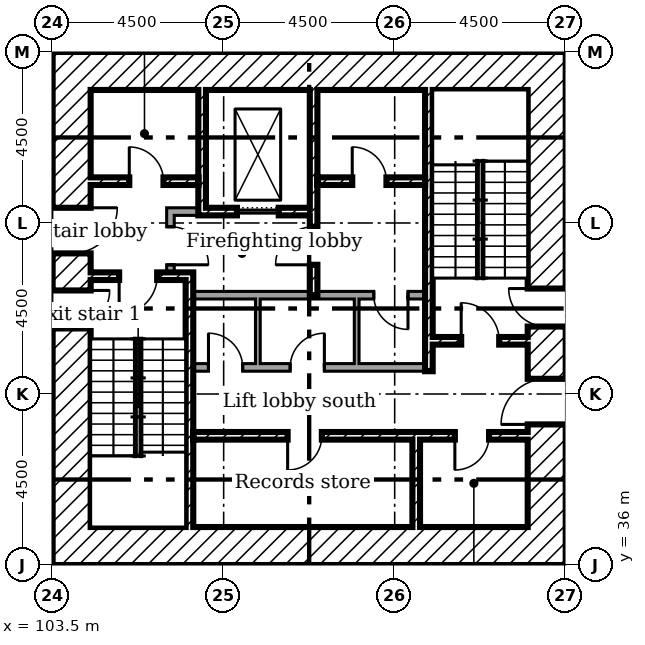
"""IFC4 building model, lengths in metres.
Left out: names, types, materials, properties, quantities, classifications, styles, units other than length and angle.
Written with IfcOpenShell. Run it as: python <this file> out.ifc"""

import sys

from ifc_helpers import new_model, si_unit, direction, frame, frame_2d, origin, place, context, subcontext, project, spatial, rectangle, extrude, element, fill, save


model = new_model("IFC4")
c1 = context("Model", 3, precision=1e-05, world=origin(), true_north=direction((0.0, 1.0)))
c2 = subcontext(c1, "Body", "Model", "MODEL_VIEW")
j1 = project(units=[si_unit("LENGTHUNIT", "METRE"), si_unit("PLANEANGLEUNIT", "RADIAN")], contexts=[c1])
p1 = place(None, origin())
s1 = spatial("IfcSite", under=j1, at=p1, CompositionType="ELEMENT")
p2 = place(p1, origin())
s2 = spatial("IfcBuilding", under=s1, at=p2, CompositionType="ELEMENT")
p3 = place(p2, frame((0.0, 0.0, -8.0)))
s3 = spatial("IfcBuildingStorey", under=s2, at=p3, CompositionType="ELEMENT", Elevation=-8.0)
p4 = place(p3, frame((116.5, 36.0, 0.0), z_axis=(0.0, 0.0, 1.0), x_axis=(0.0, 1.0, 0.0)))
e1 = element("IfcWall", 1, at=p4, inside=s3, PredefinedType="SHEAR", context=c2, shape_type="SweptSolid", body=[
    extrude(rectangle(XDim=13.5, YDim=1.0, at=frame_2d((6.75, 0.0))), origin(), (0.0, 0.0, 1.0), 3.5),
])
p5 = place(p4, frame((3.7, 0.0, 0.0)))
e2 = element("IfcOpeningElement", 2, at=p5, cuts=e1, PredefinedType="OPENING", context=c2, shape_type="SweptSolid", body=[
    extrude(rectangle(XDim=1.2, YDim=2.1, at=frame_2d((0.6, 1.05))), frame((0.0, 0.51, 0.0), z_axis=(0.0, -1.0, 0.0), x_axis=(1.0, 0.0, 0.0)), (0.0, 0.0, 1.0), 1.02),
])
p6 = place(p4, frame((6.275, 0.0, 0.0)))
e3 = element("IfcOpeningElement", 3, at=p6, cuts=e1, PredefinedType="OPENING", context=c2, shape_type="SweptSolid", body=[
    extrude(rectangle(XDim=1.0, YDim=2.1, at=frame_2d((0.5, 1.05))), frame((0.0, 0.51, 0.0), z_axis=(0.0, -1.0, 0.0), x_axis=(1.0, 0.0, 0.0)), (0.0, 0.0, 1.0), 1.02),
])
for number, where in (
    (4, (104.5, 49.0, 0.0)),
    (5, (104.5, 36.5, 0.0)),
):
    element("IfcWall", number, at=place(p3, frame(where)), inside=s3, PredefinedType="SHEAR", context=c2, shape_type="SweptSolid", body=[
        extrude(rectangle(XDim=11.5, YDim=1.0, at=frame_2d((5.75, 0.0))), origin(), (0.0, 0.0, 1.0), 3.5),
    ])
p7 = place(p3, frame((104.0, 36.0, 0.0), z_axis=(0.0, 0.0, 1.0), x_axis=(0.0, 1.0, 0.0)))
e6 = element("IfcWall", 6, at=p7, inside=s3, PredefinedType="SHEAR", context=c2, shape_type="SweptSolid", body=[
    extrude(rectangle(XDim=13.5, YDim=1.0, at=frame_2d((6.75, 0.0))), origin(), (0.0, 0.0, 1.0), 3.5),
])
p8 = place(p7, frame((8.2, 0.0, 0.0)))
e7 = element("IfcOpeningElement", 7, at=p8, cuts=e6, PredefinedType="OPENING", context=c2, shape_type="SweptSolid", body=[
    extrude(rectangle(XDim=1.2, YDim=2.1, at=frame_2d((0.6, 1.05))), frame((0.0, 0.51, 0.0), z_axis=(0.0, -1.0, 0.0), x_axis=(1.0, 0.0, 0.0)), (0.0, 0.0, 1.0), 1.02),
])
p9 = place(p7, frame((6.225, 0.0, 0.0)))
e8 = element("IfcOpeningElement", 8, at=p9, cuts=e6, PredefinedType="OPENING", context=c2, shape_type="SweptSolid", body=[
    extrude(rectangle(XDim=1.0, YDim=2.1, at=frame_2d((0.5, 1.05))), frame((0.0, 0.51, 0.0), z_axis=(0.0, -1.0, 0.0), x_axis=(1.0, 0.0, 0.0)), (0.0, 0.0, 1.0), 1.02),
])
p10 = place(p3, frame((107.433, 48.5, 0.0), z_axis=(0.0, 0.0, 1.0), x_axis=(0.0, -1.0, 0.0)))
e9 = element("IfcWall", 9, at=p10, inside=s3, PredefinedType="SHEAR", context=c2, shape_type="SweptSolid", body=[
    extrude(rectangle(XDim=3.3, YDim=0.2, at=frame_2d((1.65, 0.0))), origin(), (0.0, 0.0, 1.0), 3.5),
])
p11 = place(p3, frame((110.367, 48.5, 0.0), z_axis=(0.0, 0.0, 1.0), x_axis=(0.0, -1.0, 0.0)))
e10 = element("IfcWall", 10, at=p11, inside=s3, PredefinedType="SHEAR", context=c2, shape_type="SweptSolid", body=[
    extrude(rectangle(XDim=5.4, YDim=0.2, at=frame_2d((2.7, 0.0))), origin(), (0.0, 0.0, 1.0), 3.5),
])
p12 = place(p11, frame((3.6, 0.0, 0.0)))
e11 = element("IfcOpeningElement", 11, at=p12, cuts=e10, PredefinedType="OPENING", context=c2, shape_type="SweptSolid", body=[
    extrude(rectangle(XDim=1.0, YDim=2.1, at=frame_2d((0.5, 1.05))), frame((0.0, 0.11, 0.0), z_axis=(0.0, -1.0, 0.0), x_axis=(1.0, 0.0, 0.0)), (0.0, 0.0, 1.0), 0.22),
])
p13 = place(p3, frame((113.067, 37.0, 0.0), z_axis=(0.0, 0.0, 1.0), x_axis=(0.0, 1.0, 0.0)))
e12 = element("IfcWall", 12, at=p13, inside=s3, PredefinedType="SHEAR", context=c2, shape_type="SweptSolid", body=[
    extrude(rectangle(XDim=2.3, YDim=0.2, at=frame_2d((1.15, 0.0))), origin(), (0.0, 0.0, 1.0), 3.5),
])
p14 = place(p3, frame((106.5, 45.3, 0.0)))
e13 = element("IfcWall", 13, at=p14, inside=s3, PredefinedType="PARTITIONING", context=c2, shape_type="SweptSolid", body=[
    extrude(rectangle(XDim=0.833, YDim=0.2, at=frame_2d((0.417, 0.0))), origin(), (0.0, 0.0, 1.0), 3.5),
])
p15 = place(p3, frame((106.6, 43.7, 0.0), z_axis=(0.0, 0.0, 1.0), x_axis=(0.0, 1.0, 0.0)))
e14 = element("IfcWall", 14, at=p15, inside=s3, PredefinedType="PARTITIONING", context=c2, shape_type="SweptSolid", body=[
    extrude(rectangle(XDim=1.5, YDim=0.2, at=frame_2d((0.75, 0.0))), origin(), (0.0, 0.0, 1.0), 3.5),
])
p16 = place(p15, frame((0.2, 0.0, 0.0)))
e15 = element("IfcOpeningElement", 15, at=p16, cuts=e14, PredefinedType="OPENING", context=c2, shape_type="SweptSolid", body=[
    extrude(rectangle(XDim=1.0, YDim=2.1, at=frame_2d((0.5, 1.05))), frame((0.0, 0.11, 0.0), z_axis=(0.0, -1.0, 0.0), x_axis=(1.0, 0.0, 0.0)), (0.0, 0.0, 1.0), 0.22),
])
p17 = place(p3, frame((104.5, 46.1, 0.0)))
e16 = element("IfcWall", 16, at=p17, inside=s3, PredefinedType="SHEAR", context=c2, shape_type="SweptSolid", body=[
    extrude(rectangle(XDim=2.833, YDim=0.2, at=frame_2d((1.417, 0.0))), origin(), (0.0, 0.0, 1.0), 3.5),
])
p18 = place(p17, frame((1.017, 0.0, 0.0)))
e17 = element("IfcOpeningElement", 17, at=p18, cuts=e16, PredefinedType="OPENING", context=c2, shape_type="SweptSolid", body=[
    extrude(rectangle(XDim=0.9, YDim=2.1, at=frame_2d((0.45, 1.05))), frame((0.0, 0.11, 0.0), z_axis=(0.0, -1.0, 0.0), x_axis=(1.0, 0.0, 0.0)), (0.0, 0.0, 1.0), 0.22),
])
p19 = place(p3, frame((110.467, 46.1, 0.0)))
e18 = element("IfcWall", 18, at=p19, inside=s3, PredefinedType="SHEAR", context=c2, shape_type="SweptSolid", body=[
    extrude(rectangle(XDim=2.833, YDim=0.2, at=frame_2d((1.417, 0.0))), origin(), (0.0, 0.0, 1.0), 3.5),
])
p20 = place(p19, frame((0.917, 0.0, 0.0)))
e19 = element("IfcOpeningElement", 19, at=p20, cuts=e18, PredefinedType="OPENING", context=c2, shape_type="SweptSolid", body=[
    extrude(rectangle(XDim=0.9, YDim=2.1, at=frame_2d((0.45, 1.05))), frame((0.0, 0.11, 0.0), z_axis=(0.0, -1.0, 0.0), x_axis=(1.0, 0.0, 0.0)), (0.0, 0.0, 1.0), 0.22),
])
p21 = place(p3, frame((107.533, 45.3, 0.0)))
e20 = element("IfcWall", 20, at=p21, inside=s3, PredefinedType="SHEAR", context=c2, shape_type="SweptSolid", body=[
    extrude(rectangle(XDim=2.733, YDim=0.2, at=frame_2d((1.367, 0.0))), origin(), (0.0, 0.0, 1.0), 3.5),
])
p22 = place(p21, frame((0.817, 0.0, 0.0)))
e21 = element("IfcOpeningElement", 21, at=p22, cuts=e20, PredefinedType="OPENING", context=c2, shape_type="SweptSolid", body=[
    extrude(rectangle(XDim=1.1, YDim=2.1, at=frame_2d((0.55, 1.05))), frame((0.0, 0.11, 0.0), z_axis=(0.0, -1.0, 0.0), x_axis=(1.0, 0.0, 0.0)), (0.0, 0.0, 1.0), 0.22),
])
p23 = place(p3, frame((107.2, 39.4, 0.0)))
e22 = element("IfcWall", 22, at=p23, inside=s3, PredefinedType="SHEAR", context=c2, shape_type="SweptSolid", body=[
    extrude(rectangle(XDim=8.8, YDim=0.2, at=frame_2d((4.4, 0.0))), origin(), (0.0, 0.0, 1.0), 3.5),
])
p24 = place(p23, frame((2.483, 0.0, 0.0)))
e23 = element("IfcOpeningElement", 23, at=p24, cuts=e22, PredefinedType="OPENING", context=c2, shape_type="SweptSolid", body=[
    extrude(rectangle(XDim=0.9, YDim=2.1, at=frame_2d((0.45, 1.05))), frame((0.0, 0.11, 0.0), z_axis=(0.0, -1.0, 0.0), x_axis=(1.0, 0.0, 0.0)), (0.0, 0.0, 1.0), 0.22),
])
p25 = place(p23, frame((6.883, 0.0, 0.0)))
e24 = element("IfcOpeningElement", 24, at=p25, cuts=e22, PredefinedType="OPENING", context=c2, shape_type="SweptSolid", body=[
    extrude(rectangle(XDim=0.9, YDim=2.1, at=frame_2d((0.45, 1.05))), frame((0.0, 0.11, 0.0), z_axis=(0.0, -1.0, 0.0), x_axis=(1.0, 0.0, 0.0)), (0.0, 0.0, 1.0), 0.22),
])
p26 = place(p3, frame((107.1, 37.0, 0.0), z_axis=(0.0, 0.0, 1.0), x_axis=(0.0, 1.0, 0.0)))
e25 = element("IfcWall", 25, at=p26, inside=s3, PredefinedType="SHEAR", context=c2, shape_type="SweptSolid", body=[
    extrude(rectangle(XDim=6.7, YDim=0.2, at=frame_2d((3.35, 0.0))), origin(), (0.0, 0.0, 1.0), 3.5),
])
p27 = place(p3, frame((104.5, 43.6, 0.0)))
e26 = element("IfcWall", 26, at=p27, inside=s3, PredefinedType="SHEAR", context=c2, shape_type="SweptSolid", body=[
    extrude(rectangle(XDim=2.5, YDim=0.2, at=frame_2d((1.25, 0.0))), origin(), (0.0, 0.0, 1.0), 3.5),
])
p28 = place(p27, frame((0.75, 0.0, 0.0)))
e27 = element("IfcOpeningElement", 27, at=p28, cuts=e26, PredefinedType="OPENING", context=c2, shape_type="SweptSolid", body=[
    extrude(rectangle(XDim=1.0, YDim=2.1, at=frame_2d((0.5, 1.05))), frame((0.0, 0.11, 0.0), z_axis=(0.0, -1.0, 0.0), x_axis=(1.0, 0.0, 0.0)), (0.0, 0.0, 1.0), 0.22),
])
p29 = place(p3, frame((113.5, 41.9, 0.0)))
e28 = element("IfcWall", 28, at=p29, inside=s3, PredefinedType="SHEAR", context=c2, shape_type="SweptSolid", body=[
    extrude(rectangle(XDim=2.5, YDim=0.2, at=frame_2d((1.25, 0.0))), origin(), (0.0, 0.0, 1.0), 3.5),
])
p30 = place(p29, frame((0.75, 0.0, 0.0)))
e29 = element("IfcOpeningElement", 29, at=p30, cuts=e28, PredefinedType="OPENING", context=c2, shape_type="SweptSolid", body=[
    extrude(rectangle(XDim=1.0, YDim=2.1, at=frame_2d((0.5, 1.05))), frame((0.0, 0.11, 0.0), z_axis=(0.0, -1.0, 0.0), x_axis=(1.0, 0.0, 0.0)), (0.0, 0.0, 1.0), 0.22),
])
p31 = place(p3, frame((113.4, 41.1, 0.0), z_axis=(0.0, 0.0, 1.0), x_axis=(0.0, 1.0, 0.0)))
e30 = element("IfcWall", 30, at=p31, inside=s3, PredefinedType="SHEAR", context=c2, shape_type="SweptSolid", body=[
    extrude(rectangle(XDim=7.4, YDim=0.2, at=frame_2d((3.7, 0.0))), origin(), (0.0, 0.0, 1.0), 3.5),
])
p32 = place(p3, frame((107.2, 43.1, 0.0)))
e31 = element("IfcWall", 31, at=p32, inside=s3, PredefinedType="PARTITIONING", context=c2, shape_type="SweptSolid", body=[
    extrude(rectangle(XDim=6.1, YDim=0.2, at=frame_2d((3.05, 0.0))), origin(), (0.0, 0.0, 1.0), 3.5),
])
p33 = place(p32, frame((4.75, 0.0, 0.0)))
e32 = element("IfcOpeningElement", 32, at=p33, cuts=e31, PredefinedType="OPENING", context=c2, shape_type="SweptSolid", body=[
    extrude(rectangle(XDim=0.9, YDim=2.1, at=frame_2d((0.45, 1.05))), frame((0.0, 0.11, 0.0), z_axis=(0.0, -1.0, 0.0), x_axis=(1.0, 0.0, 0.0)), (0.0, 0.0, 1.0), 0.22),
])
p34 = place(p3, frame((107.2, 41.2, 0.0)))
e33 = element("IfcWall", 33, at=p34, inside=s3, PredefinedType="PARTITIONING", context=c2, shape_type="SweptSolid", body=[
    extrude(rectangle(XDim=6.1, YDim=0.2, at=frame_2d((3.05, 0.0))), origin(), (0.0, 0.0, 1.0), 3.5),
])
p35 = place(p34, frame((0.4, 0.0, 0.0)))
e34 = element("IfcOpeningElement", 34, at=p35, cuts=e33, PredefinedType="OPENING", context=c2, shape_type="SweptSolid", body=[
    extrude(rectangle(XDim=0.9, YDim=2.1, at=frame_2d((0.45, 1.05))), frame((0.0, 0.11, 0.0), z_axis=(0.0, -1.0, 0.0), x_axis=(1.0, 0.0, 0.0)), (0.0, 0.0, 1.0), 0.22),
])
p36 = place(p34, frame((2.55, 0.0, 0.0)))
e35 = element("IfcOpeningElement", 35, at=p36, cuts=e33, PredefinedType="OPENING", context=c2, shape_type="SweptSolid", body=[
    extrude(rectangle(XDim=0.9, YDim=2.1, at=frame_2d((0.45, 1.05))), frame((0.0, 0.11, 0.0), z_axis=(0.0, -1.0, 0.0), x_axis=(1.0, 0.0, 0.0)), (0.0, 0.0, 1.0), 0.22),
])
for number, where, z_axis, x_axis in (
    (36, (108.9, 41.3, 0.0), (0.0, 0.0, 1.0), (0.0, 1.0, 0.0)),
    (37, (111.5, 41.3, 0.0), (0.0, 0.0, 1.0), (0.0, 1.0, 0.0)),
):
    element("IfcWall", number, at=place(p3, frame(where, z_axis=z_axis, x_axis=x_axis)), inside=s3, PredefinedType="PARTITIONING", context=c2, shape_type="SweptSolid", body=[
        extrude(rectangle(XDim=1.7, YDim=0.125, at=frame_2d((0.85, 0.0))), origin(), (0.0, 0.0, 1.0), 3.5),
    ])
p37 = place(p8, frame((1.2, 0.0, 0.0), x_axis=(-1.0, 0.0, 0.0)))
e38 = element("IfcDoor", 38, at=p37, inside=s3, OperationType="SINGLE_SWING_RIGHT", PredefinedType="DOOR", context=c2, shape_type="SweptSolid", body=[
    extrude(rectangle(XDim=1.2, YDim=2.1, at=frame_2d((0.6, 1.05))), frame((0.0, 0.025, 0.0), z_axis=(0.0, -1.0, 0.0), x_axis=(1.0, 0.0, 0.0)), (0.0, 0.0, 1.0), 0.05),
])
fill(e7, e38)
p38 = place(p5, origin())
e39 = element("IfcDoor", 39, at=p38, inside=s3, OperationType="SINGLE_SWING_RIGHT", PredefinedType="DOOR", context=c2, shape_type="SweptSolid", body=[
    extrude(rectangle(XDim=1.2, YDim=2.1, at=frame_2d((0.6, 1.05))), frame((0.0, 0.025, 0.0), z_axis=(0.0, -1.0, 0.0), x_axis=(1.0, 0.0, 0.0)), (0.0, 0.0, 1.0), 0.05),
])
fill(e2, e39)
p39 = place(p28, frame((1.0, 0.0, 0.0), x_axis=(-1.0, 0.0, 0.0)))
e40 = element("IfcDoor", 40, at=p39, inside=s3, OperationType="SINGLE_SWING_LEFT", PredefinedType="DOOR", context=c2, shape_type="SweptSolid", body=[
    extrude(rectangle(XDim=1.0, YDim=2.1, at=frame_2d((0.5, 1.05))), frame((0.0, 0.025, 0.0), z_axis=(0.0, -1.0, 0.0), x_axis=(1.0, 0.0, 0.0)), (0.0, 0.0, 1.0), 0.05),
])
fill(e27, e40)
p40 = place(p9, frame((1.0, 0.0, 0.0), x_axis=(-1.0, 0.0, 0.0)))
e41 = element("IfcDoor", 41, at=p40, inside=s3, OperationType="SINGLE_SWING_RIGHT", PredefinedType="DOOR", context=c2, shape_type="SweptSolid", body=[
    extrude(rectangle(XDim=1.0, YDim=2.1, at=frame_2d((0.5, 1.05))), frame((0.0, 0.025, 0.0), z_axis=(0.0, -1.0, 0.0), x_axis=(1.0, 0.0, 0.0)), (0.0, 0.0, 1.0), 0.05),
])
fill(e8, e41)
p41 = place(p30, origin())
e42 = element("IfcDoor", 42, at=p41, inside=s3, OperationType="SINGLE_SWING_RIGHT", PredefinedType="DOOR", context=c2, shape_type="SweptSolid", body=[
    extrude(rectangle(XDim=1.0, YDim=2.1, at=frame_2d((0.5, 1.05))), frame((0.0, 0.025, 0.0), z_axis=(0.0, -1.0, 0.0), x_axis=(1.0, 0.0, 0.0)), (0.0, 0.0, 1.0), 0.05),
])
fill(e29, e42)
p42 = place(p6, origin())
e43 = element("IfcDoor", 43, at=p42, inside=s3, OperationType="SINGLE_SWING_LEFT", PredefinedType="DOOR", context=c2, shape_type="SweptSolid", body=[
    extrude(rectangle(XDim=1.0, YDim=2.1, at=frame_2d((0.5, 1.05))), frame((0.0, 0.025, 0.0), z_axis=(0.0, -1.0, 0.0), x_axis=(1.0, 0.0, 0.0)), (0.0, 0.0, 1.0), 0.05),
])
fill(e3, e43)
p43 = place(p12, frame((1.0, 0.0, 0.0), x_axis=(-1.0, 0.0, 0.0)))
e44 = element("IfcDoor", 44, at=p43, inside=s3, OperationType="SINGLE_SWING_RIGHT", PredefinedType="DOOR", context=c2, shape_type="SweptSolid", body=[
    extrude(rectangle(XDim=1.0, YDim=2.1, at=frame_2d((0.5, 1.05))), frame((0.0, 0.025, 0.0), z_axis=(0.0, -1.0, 0.0), x_axis=(1.0, 0.0, 0.0)), (0.0, 0.0, 1.0), 0.05),
])
fill(e11, e44)
p44 = place(p16, frame((1.0, 0.0, 0.0), x_axis=(-1.0, 0.0, 0.0)))
e45 = element("IfcDoor", 45, at=p44, inside=s3, OperationType="SINGLE_SWING_LEFT", PredefinedType="DOOR", context=c2, shape_type="SweptSolid", body=[
    extrude(rectangle(XDim=1.0, YDim=2.1, at=frame_2d((0.5, 1.05))), frame((0.0, 0.025, 0.0), z_axis=(0.0, -1.0, 0.0), x_axis=(1.0, 0.0, 0.0)), (0.0, 0.0, 1.0), 0.05),
])
fill(e15, e45)
p45 = place(p18, origin())
e46 = element("IfcDoor", 46, at=p45, inside=s3, OperationType="SINGLE_SWING_RIGHT", PredefinedType="DOOR", context=c2, shape_type="SweptSolid", body=[
    extrude(rectangle(XDim=0.9, YDim=2.1, at=frame_2d((0.45, 1.05))), frame((0.0, 0.025, 0.0), z_axis=(0.0, -1.0, 0.0), x_axis=(1.0, 0.0, 0.0)), (0.0, 0.0, 1.0), 0.05),
])
fill(e17, e46)
p46 = place(p20, origin())
e47 = element("IfcDoor", 47, at=p46, inside=s3, OperationType="SINGLE_SWING_RIGHT", PredefinedType="DOOR", context=c2, shape_type="SweptSolid", body=[
    extrude(rectangle(XDim=0.9, YDim=2.1, at=frame_2d((0.45, 1.05))), frame((0.0, 0.025, 0.0), z_axis=(0.0, -1.0, 0.0), x_axis=(1.0, 0.0, 0.0)), (0.0, 0.0, 1.0), 0.05),
])
fill(e19, e47)
p47 = place(p24, frame((0.9, 0.0, 0.0), x_axis=(-1.0, 0.0, 0.0)))
e48 = element("IfcDoor", 48, at=p47, inside=s3, OperationType="SINGLE_SWING_LEFT", PredefinedType="DOOR", context=c2, shape_type="SweptSolid", body=[
    extrude(rectangle(XDim=0.9, YDim=2.1, at=frame_2d((0.45, 1.05))), frame((0.0, 0.025, 0.0), z_axis=(0.0, -1.0, 0.0), x_axis=(1.0, 0.0, 0.0)), (0.0, 0.0, 1.0), 0.05),
])
fill(e23, e48)
p48 = place(p25, frame((0.9, 0.0, 0.0), x_axis=(-1.0, 0.0, 0.0)))
e49 = element("IfcDoor", 49, at=p48, inside=s3, OperationType="SINGLE_SWING_LEFT", PredefinedType="DOOR", context=c2, shape_type="SweptSolid", body=[
    extrude(rectangle(XDim=0.9, YDim=2.1, at=frame_2d((0.45, 1.05))), frame((0.0, 0.025, 0.0), z_axis=(0.0, -1.0, 0.0), x_axis=(1.0, 0.0, 0.0)), (0.0, 0.0, 1.0), 0.05),
])
fill(e24, e49)
p49 = place(p35, origin())
e50 = element("IfcDoor", 50, at=p49, inside=s3, OperationType="SINGLE_SWING_RIGHT", PredefinedType="DOOR", context=c2, shape_type="SweptSolid", body=[
    extrude(rectangle(XDim=0.9, YDim=2.1, at=frame_2d((0.45, 1.05))), frame((0.0, 0.025, 0.0), z_axis=(0.0, -1.0, 0.0), x_axis=(1.0, 0.0, 0.0)), (0.0, 0.0, 1.0), 0.05),
])
fill(e34, e50)
p50 = place(p36, origin())
e51 = element("IfcDoor", 51, at=p50, inside=s3, OperationType="SINGLE_SWING_LEFT", PredefinedType="DOOR", context=c2, shape_type="SweptSolid", body=[
    extrude(rectangle(XDim=0.9, YDim=2.1, at=frame_2d((0.45, 1.05))), frame((0.0, 0.025, 0.0), z_axis=(0.0, -1.0, 0.0), x_axis=(1.0, 0.0, 0.0)), (0.0, 0.0, 1.0), 0.05),
])
fill(e35, e51)
p51 = place(p33, frame((0.9, 0.0, 0.0), x_axis=(-1.0, 0.0, 0.0)))
e52 = element("IfcDoor", 52, at=p51, inside=s3, OperationType="SINGLE_SWING_RIGHT", PredefinedType="DOOR", context=c2, shape_type="SweptSolid", body=[
    extrude(rectangle(XDim=0.9, YDim=2.1, at=frame_2d((0.45, 1.05))), frame((0.0, 0.025, 0.0), z_axis=(0.0, -1.0, 0.0), x_axis=(1.0, 0.0, 0.0)), (0.0, 0.0, 1.0), 0.05),
])
fill(e32, e52)
p52 = place(p22, origin())
e53 = element("IfcDoor", 53, at=p52, inside=s3, OperationType="SLIDING_TO_LEFT", PredefinedType="DOOR", context=c2, shape_type="SweptSolid", body=[
    extrude(rectangle(XDim=1.1, YDim=2.1, at=frame_2d((0.55, 1.05))), frame((0.0, 0.025, 0.0), z_axis=(0.0, -1.0, 0.0), x_axis=(1.0, 0.0, 0.0)), (0.0, 0.0, 1.0), 0.05),
])
fill(e21, e53)
save(model, sys.argv[1])
